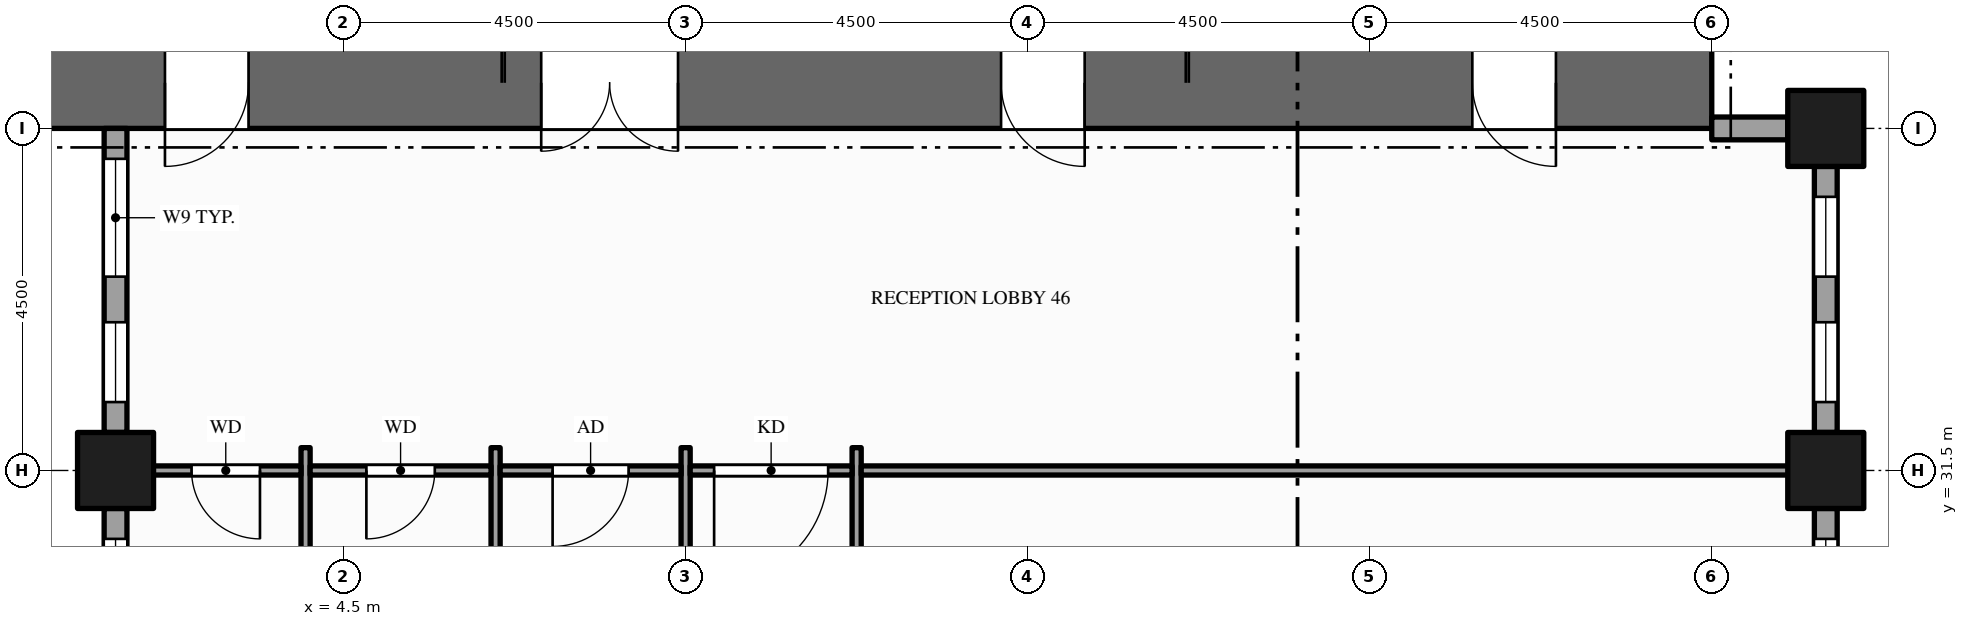
"""IFC4 building model, lengths in metres.
Left out: names, types, materials, properties, quantities, classifications, styles, units other than length and angle.
Written with IfcOpenShell. Run it as: python <this file> out.ifc"""

import sys

from ifc_helpers import new_model, si_unit, direction, frame, frame_2d, origin, origin_2d, place, context, subcontext, project, spatial, rectangle, hollow_rectangle, extrude, element, fill, save


model = new_model("IFC4")
c1 = context("Model", 3, precision=1e-05, world=origin(), true_north=direction((0.0, 1.0)))
c2 = subcontext(c1, "Body", "Model", "MODEL_VIEW")
j1 = project(units=[si_unit("LENGTHUNIT", "METRE"), si_unit("PLANEANGLEUNIT", "RADIAN")], contexts=[c1])
p1 = place(None, origin())
s1 = spatial("IfcSite", under=j1, at=p1, CompositionType="ELEMENT")
p2 = place(p1, origin())
s2 = spatial("IfcBuilding", under=s1, at=p2, CompositionType="ELEMENT")
p3 = place(p2, frame((0.0, 0.0, 107.0)))
s3 = spatial("IfcBuildingStorey", under=s2, at=p3, CompositionType="ELEMENT", Elevation=107.0)
p4 = place(p3, frame((0.0, 36.6, -0.15), z_axis=(0.0, 0.0, 1.0), x_axis=(1.0, 0.0, 0.0)))
e1 = element("IfcWall", 1, at=p4, inside=s3, PredefinedType="SHEAR", context=c2, shape_type="SweptSolid", body=[
    extrude(rectangle(XDim=22.5, YDim=1.2, at=frame_2d((11.25, 0.0))), origin(), (0.0, 0.0, 1.0), 4.0),
])
p5 = place(p4, frame((7.1, 0.0, 0.15)))
e2 = element("IfcOpeningElement", 2, at=p5, cuts=e1, PredefinedType="OPENING", context=c2, shape_type="SweptSolid", body=[
    extrude(rectangle(XDim=1.8, YDim=2.1, at=frame_2d((0.9, 1.05))), frame((0.0, 0.61, 0.0), z_axis=(0.0, -1.0, 0.0), x_axis=(1.0, 0.0, 0.0)), (0.0, 0.0, 1.0), 1.22),
])
p6 = place(p4, frame((13.15, 0.0, 0.15)))
e3 = element("IfcOpeningElement", 3, at=p6, cuts=e1, PredefinedType="OPENING", context=c2, shape_type="SweptSolid", body=[
    extrude(rectangle(XDim=1.1, YDim=2.1, at=frame_2d((0.55, 1.05))), frame((0.0, 0.61, 0.0), z_axis=(0.0, -1.0, 0.0), x_axis=(1.0, 0.0, 0.0)), (0.0, 0.0, 1.0), 1.22),
])
p7 = place(p4, frame((2.15, 0.0, 0.15)))
e4 = element("IfcOpeningElement", 4, at=p7, cuts=e1, PredefinedType="OPENING", context=c2, shape_type="SweptSolid", body=[
    extrude(rectangle(XDim=1.1, YDim=2.1, at=frame_2d((0.55, 1.05))), frame((0.0, 0.61, 0.0), z_axis=(0.0, -1.0, 0.0), x_axis=(1.0, 0.0, 0.0)), (0.0, 0.0, 1.0), 1.22),
])
p8 = place(p4, frame((19.35, 0.0, 0.15)))
e5 = element("IfcOpeningElement", 5, at=p8, cuts=e1, PredefinedType="OPENING", context=c2, shape_type="SweptSolid", body=[
    extrude(rectangle(XDim=1.1, YDim=2.1, at=frame_2d((0.55, 1.05))), frame((0.0, 0.61, 0.0), z_axis=(0.0, -1.0, 0.0), x_axis=(1.0, 0.0, 0.0)), (0.0, 0.0, 1.0), 1.22),
])
for number, where, z_axis, x_axis in (
    (6, (1.5, 31.5, -0.15), (0.0, 0.0, 1.0), (1.0, 0.0, 0.0)),
    (7, (24.0, 31.5, -0.15), (0.0, 0.0, 1.0), (1.0, 0.0, 0.0)),
    (8, (24.0, 36.0, -0.15), (0.0, 0.0, 1.0), (1.0, 0.0, 0.0)),
):
    element("IfcColumn", number, at=place(p3, frame(where, z_axis=z_axis, x_axis=x_axis)), inside=s3, PredefinedType="COLUMN", context=c2, shape_type="SweptSolid", body=[
        extrude(hollow_rectangle(XDim=1.0, YDim=1.0, WallThickness=0.05, at=origin_2d()), origin(), (0.0, 0.0, 1.0), 4.0),
    ])
p9 = place(p3, frame((24.0, 26.0, 0.0), z_axis=(0.0, 0.0, 1.0), x_axis=(0.0, 1.0, 0.0)))
e9 = element("IfcWall", 9, at=p9, inside=s3, PredefinedType="STANDARD", context=c2, shape_type="SweptSolid", body=[
    extrude(rectangle(XDim=5.0, YDim=0.3, at=frame_2d((2.5, 0.0))), origin(), (0.0, 0.0, 1.0), 3.154),
])
p10 = place(p9, frame((1.3, 0.0, 0.9)))
e10 = element("IfcOpeningElement", 10, at=p10, cuts=e9, PredefinedType="OPENING", context=c2, shape_type="SweptSolid", body=[
    extrude(rectangle(XDim=1.65, YDim=2.0, at=frame_2d((0.825, 1.0))), frame((0.0, 0.16, 0.0), z_axis=(0.0, -1.0, 0.0), x_axis=(1.0, 0.0, 0.0)), (0.0, 0.0, 1.0), 0.32),
])
p11 = place(p9, frame((3.55, 0.0, 0.9)))
e11 = element("IfcOpeningElement", 11, at=p11, cuts=e9, PredefinedType="OPENING", context=c2, shape_type="SweptSolid", body=[
    extrude(rectangle(XDim=1.05, YDim=2.0, at=frame_2d((0.525, 1.0))), frame((0.0, 0.16, 0.0), z_axis=(0.0, -1.0, 0.0), x_axis=(1.0, 0.0, 0.0)), (0.0, 0.0, 1.0), 0.32),
])
p12 = place(p3, frame((24.0, 32.0, 0.0), z_axis=(0.0, 0.0, 1.0), x_axis=(0.0, 1.0, 0.0)))
e12 = element("IfcWall", 12, at=p12, inside=s3, PredefinedType="STANDARD", context=c2, shape_type="SweptSolid", body=[
    extrude(rectangle(XDim=3.5, YDim=0.3, at=frame_2d((1.75, 0.0))), origin(), (0.0, 0.0, 1.0), 3.154),
])
p13 = place(p12, frame((0.4, 0.0, 0.9)))
e13 = element("IfcOpeningElement", 13, at=p13, cuts=e12, PredefinedType="OPENING", context=c2, shape_type="SweptSolid", body=[
    extrude(rectangle(XDim=1.05, YDim=2.0, at=frame_2d((0.525, 1.0))), frame((0.0, 0.16, 0.0), z_axis=(0.0, -1.0, 0.0), x_axis=(1.0, 0.0, 0.0)), (0.0, 0.0, 1.0), 0.32),
])
p14 = place(p12, frame((2.05, 0.0, 0.9)))
e14 = element("IfcOpeningElement", 14, at=p14, cuts=e12, PredefinedType="OPENING", context=c2, shape_type="SweptSolid", body=[
    extrude(rectangle(XDim=1.05, YDim=2.0, at=frame_2d((0.525, 1.0))), frame((0.0, 0.16, 0.0), z_axis=(0.0, -1.0, 0.0), x_axis=(1.0, 0.0, 0.0)), (0.0, 0.0, 1.0), 0.32),
])
p15 = place(p3, frame((23.5, 36.0, 0.0), z_axis=(0.0, 0.0, 1.0), x_axis=(-1.0, 0.0, 0.0)))
e15 = element("IfcWall", 15, at=p15, inside=s3, PredefinedType="STANDARD", context=c2, shape_type="SweptSolid", body=[
    extrude(rectangle(XDim=1.0, YDim=0.3, at=frame_2d((0.5, 0.0))), origin(), (0.0, 0.0, 1.0), 2.938),
])
p16 = place(p3, frame((1.5, 36.0, 0.0), z_axis=(0.0, 0.0, 1.0), x_axis=(0.0, -1.0, 0.0)))
e16 = element("IfcWall", 16, at=p16, inside=s3, PredefinedType="STANDARD", context=c2, shape_type="SweptSolid", body=[
    extrude(rectangle(XDim=4.0, YDim=0.3, at=frame_2d((2.0, 0.0))), origin(), (0.0, 0.0, 1.0), 3.154),
])
p17 = place(p16, frame((0.4, 0.0, 0.9)))
e17 = element("IfcOpeningElement", 17, at=p17, cuts=e16, PredefinedType="OPENING", context=c2, shape_type="SweptSolid", body=[
    extrude(rectangle(XDim=1.55, YDim=2.0, at=frame_2d((0.775, 1.0))), frame((0.0, 0.16, 0.0), z_axis=(0.0, -1.0, 0.0), x_axis=(1.0, 0.0, 0.0)), (0.0, 0.0, 1.0), 0.32),
])
p18 = place(p16, frame((2.55, 0.0, 0.9)))
e18 = element("IfcOpeningElement", 18, at=p18, cuts=e16, PredefinedType="OPENING", context=c2, shape_type="SweptSolid", body=[
    extrude(rectangle(XDim=1.05, YDim=2.0, at=frame_2d((0.525, 1.0))), frame((0.0, 0.16, 0.0), z_axis=(0.0, -1.0, 0.0), x_axis=(1.0, 0.0, 0.0)), (0.0, 0.0, 1.0), 0.32),
])
p19 = place(p3, frame((1.5, 31.0, 0.0), z_axis=(0.0, 0.0, 1.0), x_axis=(0.0, -1.0, 0.0)))
e19 = element("IfcWall", 19, at=p19, inside=s3, PredefinedType="STANDARD", context=c2, shape_type="SweptSolid", body=[
    extrude(rectangle(XDim=3.5, YDim=0.3, at=frame_2d((1.75, 0.0))), origin(), (0.0, 0.0, 1.0), 3.154),
])
p20 = place(p19, frame((0.4, 0.0, 0.9)))
e20 = element("IfcOpeningElement", 20, at=p20, cuts=e19, PredefinedType="OPENING", context=c2, shape_type="SweptSolid", body=[
    extrude(rectangle(XDim=1.05, YDim=2.0, at=frame_2d((0.525, 1.0))), frame((0.0, 0.16, 0.0), z_axis=(0.0, -1.0, 0.0), x_axis=(1.0, 0.0, 0.0)), (0.0, 0.0, 1.0), 0.32),
])
p21 = place(p19, frame((2.05, 0.0, 0.9)))
e21 = element("IfcOpeningElement", 21, at=p21, cuts=e19, PredefinedType="OPENING", context=c2, shape_type="SweptSolid", body=[
    extrude(rectangle(XDim=1.05, YDim=2.0, at=frame_2d((0.525, 1.0))), frame((0.0, 0.16, 0.0), z_axis=(0.0, -1.0, 0.0), x_axis=(1.0, 0.0, 0.0)), (0.0, 0.0, 1.0), 0.32),
])
for number, where, z_axis, x_axis in (
    (22, (4.0, 26.7, 0.0), (0.0, 0.0, 1.0), (0.0, 1.0, 0.0)),
    (23, (6.5, 26.7, 0.0), (0.0, 0.0, 1.0), (0.0, 1.0, 0.0)),
):
    element("IfcWall", number, at=place(p3, frame(where, z_axis=z_axis, x_axis=x_axis)), inside=s3, PredefinedType="PARTITIONING", context=c2, shape_type="SweptSolid", body=[
        extrude(rectangle(XDim=5.1, YDim=0.12, at=frame_2d((2.55, 0.0))), origin(), (0.0, 0.0, 1.0), 3.85),
    ])
p22 = place(p3, frame((9.0, 8.7, 0.0), z_axis=(0.0, 0.0, 1.0), x_axis=(0.0, 1.0, 0.0)))
e24 = element("IfcWall", 24, at=p22, inside=s3, PredefinedType="PARTITIONING", context=c2, shape_type="SweptSolid", body=[
    extrude(rectangle(XDim=23.1, YDim=0.12, at=frame_2d((11.55, 0.0))), origin(), (0.0, 0.0, 1.0), 2.6),
])
p23 = place(p22, frame((2.05, 0.0, 0.0)))
e25 = element("IfcOpeningElement", 25, at=p23, cuts=e24, PredefinedType="OPENING", context=c2, shape_type="SweptSolid", body=[
    extrude(rectangle(XDim=1.0, YDim=2.1, at=frame_2d((0.5, 1.05))), frame((0.0, 0.07, 0.0), z_axis=(0.0, -1.0, 0.0), x_axis=(1.0, 0.0, 0.0)), (0.0, 0.0, 1.0), 0.14),
])
p24 = place(p22, frame((7.675, 0.0, 0.0)))
e26 = element("IfcOpeningElement", 26, at=p24, cuts=e24, PredefinedType="OPENING", context=c2, shape_type="SweptSolid", body=[
    extrude(rectangle(XDim=1.0, YDim=2.1, at=frame_2d((0.5, 1.05))), frame((0.0, 0.07, 0.0), z_axis=(0.0, -1.0, 0.0), x_axis=(1.0, 0.0, 0.0)), (0.0, 0.0, 1.0), 0.14),
])
p25 = place(p22, frame((14.355, 0.0, 0.0)))
e27 = element("IfcOpeningElement", 27, at=p25, cuts=e24, PredefinedType="OPENING", context=c2, shape_type="SweptSolid", body=[
    extrude(rectangle(XDim=1.2, YDim=2.1, at=frame_2d((0.6, 1.05))), frame((0.0, 0.07, 0.0), z_axis=(0.0, -1.0, 0.0), x_axis=(1.0, 0.0, 0.0)), (0.0, 0.0, 1.0), 0.14),
])
p26 = place(p3, frame((11.25, 8.7, 0.0), z_axis=(0.0, 0.0, 1.0), x_axis=(0.0, 1.0, 0.0)))
e28 = element("IfcWall", 28, at=p26, inside=s3, PredefinedType="PARTITIONING", context=c2, shape_type="SweptSolid", body=[
    extrude(rectangle(XDim=23.1, YDim=0.12, at=frame_2d((11.55, 0.0))), origin(), (0.0, 0.0, 1.0), 2.6),
])
p27 = place(p26, frame((18.925, 0.0, 0.0)))
e29 = element("IfcOpeningElement", 29, at=p27, cuts=e28, PredefinedType="OPENING", context=c2, shape_type="SweptSolid", body=[
    extrude(rectangle(XDim=1.0, YDim=2.1, at=frame_2d((0.5, 1.05))), frame((0.0, 0.07, 0.0), z_axis=(0.0, -1.0, 0.0), x_axis=(1.0, 0.0, 0.0)), (0.0, 0.0, 1.0), 0.14),
])
p28 = place(p26, frame((4.2, 0.0, 0.0)))
e30 = element("IfcOpeningElement", 30, at=p28, cuts=e28, PredefinedType="OPENING", context=c2, shape_type="SweptSolid", body=[
    extrude(rectangle(XDim=1.2, YDim=2.1, at=frame_2d((0.6, 1.05))), frame((0.0, 0.07, 0.0), z_axis=(0.0, -1.0, 0.0), x_axis=(1.0, 0.0, 0.0)), (0.0, 0.0, 1.0), 0.14),
])
p29 = place(p3, frame((1.65, 31.5, 0.0), z_axis=(0.0, 0.0, 1.0), x_axis=(1.0, 0.0, 0.0)))
e31 = element("IfcWall", 31, at=p29, inside=s3, PredefinedType="PARTITIONING", context=c2, shape_type="SweptSolid", body=[
    extrude(rectangle(XDim=2.29, YDim=0.12, at=frame_2d((1.145, 0.0))), origin(), (0.0, 0.0, 1.0), 2.938),
])
p30 = place(p29, frame((0.85, 0.0, 0.0)))
e32 = element("IfcOpeningElement", 32, at=p30, cuts=e31, PredefinedType="OPENING", context=c2, shape_type="SweptSolid", body=[
    extrude(rectangle(XDim=0.9, YDim=2.1, at=frame_2d((0.45, 1.05))), frame((0.0, 0.07, 0.0), z_axis=(0.0, -1.0, 0.0), x_axis=(1.0, 0.0, 0.0)), (0.0, 0.0, 1.0), 0.14),
])
p31 = place(p3, frame((4.06, 31.5, 0.0), z_axis=(0.0, 0.0, 1.0), x_axis=(1.0, 0.0, 0.0)))
e33 = element("IfcWall", 33, at=p31, inside=s3, PredefinedType="PARTITIONING", context=c2, shape_type="SweptSolid", body=[
    extrude(rectangle(XDim=2.38, YDim=0.12, at=frame_2d((1.19, 0.0))), origin(), (0.0, 0.0, 1.0), 2.938),
])
p32 = place(p31, frame((0.74, 0.0, 0.0)))
e34 = element("IfcOpeningElement", 34, at=p32, cuts=e33, PredefinedType="OPENING", context=c2, shape_type="SweptSolid", body=[
    extrude(rectangle(XDim=0.9, YDim=2.1, at=frame_2d((0.45, 1.05))), frame((0.0, 0.07, 0.0), z_axis=(0.0, -1.0, 0.0), x_axis=(1.0, 0.0, 0.0)), (0.0, 0.0, 1.0), 0.14),
])
p33 = place(p3, frame((6.56, 31.5, 0.0), z_axis=(0.0, 0.0, 1.0), x_axis=(1.0, 0.0, 0.0)))
e35 = element("IfcWall", 35, at=p33, inside=s3, PredefinedType="PARTITIONING", context=c2, shape_type="SweptSolid", body=[
    extrude(rectangle(XDim=2.38, YDim=0.12, at=frame_2d((1.19, 0.0))), origin(), (0.0, 0.0, 1.0), 2.938),
])
p34 = place(p33, frame((0.69, 0.0, 0.0)))
e36 = element("IfcOpeningElement", 36, at=p34, cuts=e35, PredefinedType="OPENING", context=c2, shape_type="SweptSolid", body=[
    extrude(rectangle(XDim=1.0, YDim=2.1, at=frame_2d((0.5, 1.05))), frame((0.0, 0.07, 0.0), z_axis=(0.0, -1.0, 0.0), x_axis=(1.0, 0.0, 0.0)), (0.0, 0.0, 1.0), 0.14),
])
p35 = place(p3, frame((9.06, 31.5, 0.0), z_axis=(0.0, 0.0, 1.0), x_axis=(1.0, 0.0, 0.0)))
e37 = element("IfcWall", 37, at=p35, inside=s3, PredefinedType="PARTITIONING", context=c2, shape_type="SweptSolid", body=[
    extrude(rectangle(XDim=2.13, YDim=0.12, at=frame_2d((1.065, 0.0))), origin(), (0.0, 0.0, 1.0), 2.938),
])
p36 = place(p35, frame((0.315, 0.0, 0.0)))
e38 = element("IfcOpeningElement", 38, at=p36, cuts=e37, PredefinedType="OPENING", context=c2, shape_type="SweptSolid", body=[
    extrude(rectangle(XDim=1.5, YDim=2.1, at=frame_2d((0.75, 1.05))), frame((0.0, 0.07, 0.0), z_axis=(0.0, -1.0, 0.0), x_axis=(1.0, 0.0, 0.0)), (0.0, 0.0, 1.0), 0.14),
])
p37 = place(p3, frame((11.31, 31.5, 0.0), z_axis=(0.0, 0.0, 1.0), x_axis=(1.0, 0.0, 0.0)))
e39 = element("IfcWall", 39, at=p37, inside=s3, PredefinedType="PARTITIONING", context=c2, shape_type="SweptSolid", body=[
    extrude(rectangle(XDim=12.54, YDim=0.12, at=frame_2d((6.27, 0.0))), origin(), (0.0, 0.0, 1.0), 2.938),
])
p38 = place(p11, origin())
e40 = element("IfcWindow", 40, at=p38, inside=s3, PartitioningType="SINGLE_PANEL", PredefinedType="WINDOW", context=c2, shape_type="SweptSolid", body=[
    extrude(rectangle(XDim=1.05, YDim=2.0, at=frame_2d((0.525, 1.0))), frame((0.0, 0.03, 0.0), z_axis=(0.0, -1.0, 0.0), x_axis=(1.0, 0.0, 0.0)), (0.0, 0.0, 1.0), 0.06),
])
fill(e11, e40)
p39 = place(p13, origin())
e41 = element("IfcWindow", 41, at=p39, inside=s3, PartitioningType="SINGLE_PANEL", PredefinedType="WINDOW", context=c2, shape_type="SweptSolid", body=[
    extrude(rectangle(XDim=1.05, YDim=2.0, at=frame_2d((0.525, 1.0))), frame((0.0, 0.03, 0.0), z_axis=(0.0, -1.0, 0.0), x_axis=(1.0, 0.0, 0.0)), (0.0, 0.0, 1.0), 0.06),
])
fill(e13, e41)
p40 = place(p14, origin())
e42 = element("IfcWindow", 42, at=p40, inside=s3, PartitioningType="SINGLE_PANEL", PredefinedType="WINDOW", context=c2, shape_type="SweptSolid", body=[
    extrude(rectangle(XDim=1.05, YDim=2.0, at=frame_2d((0.525, 1.0))), frame((0.0, 0.03, 0.0), z_axis=(0.0, -1.0, 0.0), x_axis=(1.0, 0.0, 0.0)), (0.0, 0.0, 1.0), 0.06),
])
fill(e14, e42)
p41 = place(p17, origin())
e43 = element("IfcWindow", 43, at=p41, inside=s3, PartitioningType="SINGLE_PANEL", PredefinedType="WINDOW", context=c2, shape_type="SweptSolid", body=[
    extrude(rectangle(XDim=1.55, YDim=2.0, at=frame_2d((0.775, 1.0))), frame((0.0, 0.03, 0.0), z_axis=(0.0, -1.0, 0.0), x_axis=(1.0, 0.0, 0.0)), (0.0, 0.0, 1.0), 0.06),
])
fill(e17, e43)
p42 = place(p18, origin())
e44 = element("IfcWindow", 44, at=p42, inside=s3, PartitioningType="SINGLE_PANEL", PredefinedType="WINDOW", context=c2, shape_type="SweptSolid", body=[
    extrude(rectangle(XDim=1.05, YDim=2.0, at=frame_2d((0.525, 1.0))), frame((0.0, 0.03, 0.0), z_axis=(0.0, -1.0, 0.0), x_axis=(1.0, 0.0, 0.0)), (0.0, 0.0, 1.0), 0.06),
])
fill(e18, e44)
p43 = place(p20, origin())
e45 = element("IfcWindow", 45, at=p43, inside=s3, PartitioningType="SINGLE_PANEL", PredefinedType="WINDOW", context=c2, shape_type="SweptSolid", body=[
    extrude(rectangle(XDim=1.05, YDim=2.0, at=frame_2d((0.525, 1.0))), frame((0.0, 0.03, 0.0), z_axis=(0.0, -1.0, 0.0), x_axis=(1.0, 0.0, 0.0)), (0.0, 0.0, 1.0), 0.06),
])
fill(e20, e45)
p44 = place(p5, origin())
e46 = element("IfcDoor", 46, at=p44, inside=s3, OperationType="DOUBLE_DOOR_SINGLE_SWING", PredefinedType="DOOR", context=c2, shape_type="SweptSolid", body=[
    extrude(rectangle(XDim=1.8, YDim=2.1, at=frame_2d((0.9, 1.05))), frame((0.0, 0.025, 0.0), z_axis=(0.0, -1.0, 0.0), x_axis=(1.0, 0.0, 0.0)), (0.0, 0.0, 1.0), 0.05),
])
fill(e2, e46)
p45 = place(p6, origin())
e47 = element("IfcDoor", 47, at=p45, inside=s3, OperationType="SINGLE_SWING_RIGHT", PredefinedType="DOOR", context=c2, shape_type="SweptSolid", body=[
    extrude(rectangle(XDim=1.1, YDim=2.1, at=frame_2d((0.55, 1.05))), frame((0.0, 0.025, 0.0), z_axis=(0.0, -1.0, 0.0), x_axis=(1.0, 0.0, 0.0)), (0.0, 0.0, 1.0), 0.05),
])
fill(e3, e47)
p46 = place(p7, origin())
e48 = element("IfcDoor", 48, at=p46, inside=s3, OperationType="SINGLE_SWING_LEFT", PredefinedType="DOOR", context=c2, shape_type="SweptSolid", body=[
    extrude(rectangle(XDim=1.1, YDim=2.1, at=frame_2d((0.55, 1.05))), frame((0.0, 0.025, 0.0), z_axis=(0.0, -1.0, 0.0), x_axis=(1.0, 0.0, 0.0)), (0.0, 0.0, 1.0), 0.05),
])
fill(e4, e48)
p47 = place(p8, origin())
e49 = element("IfcDoor", 49, at=p47, inside=s3, OperationType="SINGLE_SWING_RIGHT", PredefinedType="DOOR", context=c2, shape_type="SweptSolid", body=[
    extrude(rectangle(XDim=1.1, YDim=2.1, at=frame_2d((0.55, 1.05))), frame((0.0, 0.025, 0.0), z_axis=(0.0, -1.0, 0.0), x_axis=(1.0, 0.0, 0.0)), (0.0, 0.0, 1.0), 0.05),
])
fill(e5, e49)
p48 = place(p36, origin())
e50 = element("IfcDoor", 50, at=p48, inside=s3, OperationType="SINGLE_SWING_LEFT", PredefinedType="DOOR", context=c2, shape_type="SweptSolid", body=[
    extrude(rectangle(XDim=1.5, YDim=2.1, at=frame_2d((0.75, 1.05))), frame((0.0, 0.025, 0.0), z_axis=(0.0, -1.0, 0.0), x_axis=(1.0, 0.0, 0.0)), (0.0, 0.0, 1.0), 0.05),
])
fill(e38, e50)
p49 = place(p30, origin())
e51 = element("IfcDoor", 51, at=p49, inside=s3, OperationType="SINGLE_SWING_RIGHT", PredefinedType="DOOR", context=c2, shape_type="SweptSolid", body=[
    extrude(rectangle(XDim=0.9, YDim=2.1, at=frame_2d((0.45, 1.05))), frame((0.0, 0.025, 0.0), z_axis=(0.0, -1.0, 0.0), x_axis=(1.0, 0.0, 0.0)), (0.0, 0.0, 1.0), 0.05),
])
fill(e32, e51)
p50 = place(p32, origin())
e52 = element("IfcDoor", 52, at=p50, inside=s3, OperationType="SINGLE_SWING_LEFT", PredefinedType="DOOR", context=c2, shape_type="SweptSolid", body=[
    extrude(rectangle(XDim=0.9, YDim=2.1, at=frame_2d((0.45, 1.05))), frame((0.0, 0.025, 0.0), z_axis=(0.0, -1.0, 0.0), x_axis=(1.0, 0.0, 0.0)), (0.0, 0.0, 1.0), 0.05),
])
fill(e34, e52)
p51 = place(p34, origin())
e53 = element("IfcDoor", 53, at=p51, inside=s3, OperationType="SINGLE_SWING_LEFT", PredefinedType="DOOR", context=c2, shape_type="SweptSolid", body=[
    extrude(rectangle(XDim=1.0, YDim=2.1, at=frame_2d((0.5, 1.05))), frame((0.0, 0.025, 0.0), z_axis=(0.0, -1.0, 0.0), x_axis=(1.0, 0.0, 0.0)), (0.0, 0.0, 1.0), 0.05),
])
fill(e36, e53)
save(model, sys.argv[1])
